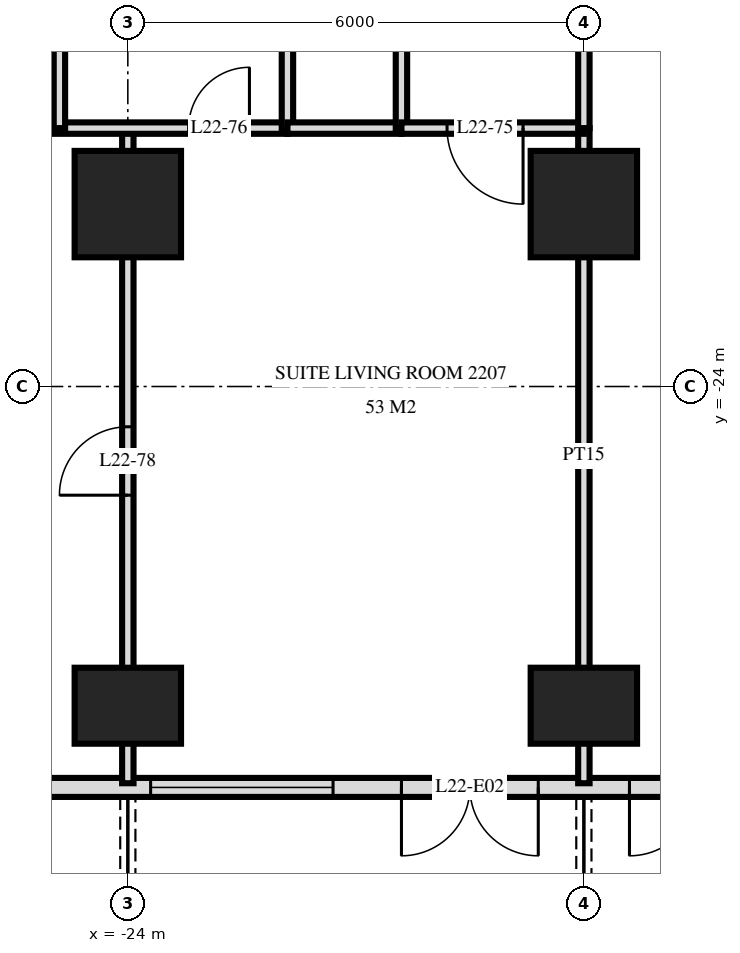
"""IFC4 building model, lengths in metres.
Left out: names, types, materials, properties, quantities, classifications, styles, units other than length and angle.
Written with IfcOpenShell. Run it as: python <this file> out.ifc"""

import sys

from ifc_helpers import new_model, si_unit, direction, frame, frame_2d, origin, origin_2d, place, context, subcontext, project, spatial, rectangle, extrude, element, fill, save


model = new_model("IFC4")
c1 = context("Model", 3, precision=1e-05, world=origin(), true_north=direction((0.0, 1.0)))
c2 = subcontext(c1, "Body", "Model", "MODEL_VIEW")
j1 = project(units=[si_unit("LENGTHUNIT", "METRE"), si_unit("PLANEANGLEUNIT", "RADIAN")], contexts=[c1])
p1 = place(None, origin())
s1 = spatial("IfcSite", under=j1, at=p1, CompositionType="ELEMENT")
p2 = place(p1, origin())
s2 = spatial("IfcBuilding", under=s1, at=p2, CompositionType="ELEMENT")
p3 = place(p2, frame((0.0, 0.0, 88.8)))
s3 = spatial("IfcBuildingStorey", under=s2, at=p3, CompositionType="ELEMENT", Elevation=88.8)
p4 = place(p3, frame((-24.0, -28.2, 0.0), z_axis=(0.0, 0.0, 1.0), x_axis=(1.0, 0.0, 0.0)))
e1 = element("IfcColumn", 1, at=p4, inside=s3, PredefinedType="COLUMN", context=c2, shape_type="SweptSolid", body=[
    extrude(rectangle(XDim=1.4, YDim=1.0, at=origin_2d()), origin(), (0.0, 0.0, 1.0), 3.6),
])
p5 = place(p3, frame((-24.0, -21.6, 0.0), z_axis=(0.0, 0.0, 1.0), x_axis=(1.0, 0.0, 0.0)))
e2 = element("IfcColumn", 2, at=p5, inside=s3, PredefinedType="COLUMN", context=c2, shape_type="SweptSolid", body=[
    extrude(rectangle(XDim=1.4, YDim=1.4, at=origin_2d()), origin(), (0.0, 0.0, 1.0), 3.6),
])
p6 = place(p3, frame((-18.0, -28.2, 0.0), z_axis=(0.0, 0.0, 1.0), x_axis=(1.0, 0.0, 0.0)))
e3 = element("IfcColumn", 3, at=p6, inside=s3, PredefinedType="COLUMN", context=c2, shape_type="SweptSolid", body=[
    extrude(rectangle(XDim=1.4, YDim=1.0, at=origin_2d()), origin(), (0.0, 0.0, 1.0), 3.6),
])
p7 = place(p3, frame((-18.0, -21.6, 0.0), z_axis=(0.0, 0.0, 1.0), x_axis=(1.0, 0.0, 0.0)))
e4 = element("IfcColumn", 4, at=p7, inside=s3, PredefinedType="COLUMN", context=c2, shape_type="SweptSolid", body=[
    extrude(rectangle(XDim=1.4, YDim=1.4, at=origin_2d()), origin(), (0.0, 0.0, 1.0), 3.6),
])
p8 = place(p3, frame((-28.775, -29.275, 0.0), z_axis=(0.0, 0.0, 1.0), x_axis=(1.0, 0.0, 0.0)))
e5 = element("IfcWall", 5, at=p8, inside=s3, PredefinedType="SOLIDWALL", context=c2, shape_type="SweptSolid", body=[
    extrude(rectangle(XDim=57.551, YDim=0.25, at=frame_2d((28.775, 0.0))), origin(), (0.0, 0.0, 1.0), 3.32),
])
p9 = place(p8, frame((0.575, 0.0, 0.0)))
e6 = element("IfcOpeningElement", 6, at=p9, cuts=e5, PredefinedType="OPENING", context=c2, shape_type="SweptSolid", body=[
    extrude(rectangle(XDim=1.8, YDim=2.4, at=frame_2d((0.9, 1.2))), frame((0.0, 0.135, 0.0), z_axis=(0.0, -1.0, 0.0), x_axis=(1.0, 0.0, 0.0)), (0.0, 0.0, 1.0), 0.27),
])
p10 = place(p8, frame((5.075, 0.0, 0.3)))
e7 = element("IfcOpeningElement", 7, at=p10, cuts=e5, PredefinedType="OPENING", context=c2, shape_type="SweptSolid", body=[
    extrude(rectangle(XDim=2.4, YDim=2.1, at=frame_2d((1.2, 1.05))), frame((0.0, 0.135, 0.0), z_axis=(0.0, -1.0, 0.0), x_axis=(1.0, 0.0, 0.0)), (0.0, 0.0, 1.0), 0.27),
])
p11 = place(p8, frame((8.375, 0.0, 0.0)))
e8 = element("IfcOpeningElement", 8, at=p11, cuts=e5, PredefinedType="OPENING", context=c2, shape_type="SweptSolid", body=[
    extrude(rectangle(XDim=1.8, YDim=2.4, at=frame_2d((0.9, 1.2))), frame((0.0, 0.135, 0.0), z_axis=(0.0, -1.0, 0.0), x_axis=(1.0, 0.0, 0.0)), (0.0, 0.0, 1.0), 0.27),
])
p12 = place(p8, frame((11.375, 0.0, 0.0)))
e9 = element("IfcOpeningElement", 9, at=p12, cuts=e5, PredefinedType="OPENING", context=c2, shape_type="SweptSolid", body=[
    extrude(rectangle(XDim=1.8, YDim=2.4, at=frame_2d((0.9, 1.2))), frame((0.0, 0.135, 0.0), z_axis=(0.0, -1.0, 0.0), x_axis=(1.0, 0.0, 0.0)), (0.0, 0.0, 1.0), 0.27),
])
p13 = place(p8, frame((14.075, 0.0, 0.3)))
e10 = element("IfcOpeningElement", 10, at=p13, cuts=e5, PredefinedType="OPENING", context=c2, shape_type="SweptSolid", body=[
    extrude(rectangle(XDim=2.4, YDim=2.1, at=frame_2d((1.2, 1.05))), frame((0.0, 0.135, 0.0), z_axis=(0.0, -1.0, 0.0), x_axis=(1.0, 0.0, 0.0)), (0.0, 0.0, 1.0), 0.27),
])
p14 = place(p8, frame((17.375, 0.0, 0.0)))
e11 = element("IfcOpeningElement", 11, at=p14, cuts=e5, PredefinedType="OPENING", context=c2, shape_type="SweptSolid", body=[
    extrude(rectangle(XDim=1.8, YDim=2.4, at=frame_2d((0.9, 1.2))), frame((0.0, 0.135, 0.0), z_axis=(0.0, -1.0, 0.0), x_axis=(1.0, 0.0, 0.0)), (0.0, 0.0, 1.0), 0.27),
])
p15 = place(p8, frame((20.075, 0.0, 0.3)))
e12 = element("IfcOpeningElement", 12, at=p15, cuts=e5, PredefinedType="OPENING", context=c2, shape_type="SweptSolid", body=[
    extrude(rectangle(XDim=2.4, YDim=2.1, at=frame_2d((1.2, 1.05))), frame((0.0, 0.135, 0.0), z_axis=(0.0, -1.0, 0.0), x_axis=(1.0, 0.0, 0.0)), (0.0, 0.0, 1.0), 0.27),
])
p16 = place(p8, frame((23.075, 0.0, 0.3)))
e13 = element("IfcOpeningElement", 13, at=p16, cuts=e5, PredefinedType="OPENING", context=c2, shape_type="SweptSolid", body=[
    extrude(rectangle(XDim=2.4, YDim=2.1, at=frame_2d((1.2, 1.05))), frame((0.0, 0.135, 0.0), z_axis=(0.0, -1.0, 0.0), x_axis=(1.0, 0.0, 0.0)), (0.0, 0.0, 1.0), 0.27),
])
p17 = place(p8, frame((26.375, 0.0, 0.0)))
e14 = element("IfcOpeningElement", 14, at=p17, cuts=e5, PredefinedType="OPENING", context=c2, shape_type="SweptSolid", body=[
    extrude(rectangle(XDim=1.8, YDim=2.4, at=frame_2d((0.9, 1.2))), frame((0.0, 0.135, 0.0), z_axis=(0.0, -1.0, 0.0), x_axis=(1.0, 0.0, 0.0)), (0.0, 0.0, 1.0), 0.27),
])
p18 = place(p8, frame((29.375, 0.0, 0.0)))
e15 = element("IfcOpeningElement", 15, at=p18, cuts=e5, PredefinedType="OPENING", context=c2, shape_type="SweptSolid", body=[
    extrude(rectangle(XDim=1.8, YDim=2.4, at=frame_2d((0.9, 1.2))), frame((0.0, 0.135, 0.0), z_axis=(0.0, -1.0, 0.0), x_axis=(1.0, 0.0, 0.0)), (0.0, 0.0, 1.0), 0.27),
])
p19 = place(p8, frame((32.075, 0.0, 0.3)))
e16 = element("IfcOpeningElement", 16, at=p19, cuts=e5, PredefinedType="OPENING", context=c2, shape_type="SweptSolid", body=[
    extrude(rectangle(XDim=2.4, YDim=2.1, at=frame_2d((1.2, 1.05))), frame((0.0, 0.135, 0.0), z_axis=(0.0, -1.0, 0.0), x_axis=(1.0, 0.0, 0.0)), (0.0, 0.0, 1.0), 0.27),
])
p20 = place(p8, frame((35.375, 0.0, 0.0)))
e17 = element("IfcOpeningElement", 17, at=p20, cuts=e5, PredefinedType="OPENING", context=c2, shape_type="SweptSolid", body=[
    extrude(rectangle(XDim=1.8, YDim=2.4, at=frame_2d((0.9, 1.2))), frame((0.0, 0.135, 0.0), z_axis=(0.0, -1.0, 0.0), x_axis=(1.0, 0.0, 0.0)), (0.0, 0.0, 1.0), 0.27),
])
p21 = place(p8, frame((38.075, 0.0, 0.3)))
e18 = element("IfcOpeningElement", 18, at=p21, cuts=e5, PredefinedType="OPENING", context=c2, shape_type="SweptSolid", body=[
    extrude(rectangle(XDim=2.4, YDim=2.1, at=frame_2d((1.2, 1.05))), frame((0.0, 0.135, 0.0), z_axis=(0.0, -1.0, 0.0), x_axis=(1.0, 0.0, 0.0)), (0.0, 0.0, 1.0), 0.27),
])
p22 = place(p8, frame((41.075, 0.0, 0.3)))
e19 = element("IfcOpeningElement", 19, at=p22, cuts=e5, PredefinedType="OPENING", context=c2, shape_type="SweptSolid", body=[
    extrude(rectangle(XDim=2.4, YDim=2.1, at=frame_2d((1.2, 1.05))), frame((0.0, 0.135, 0.0), z_axis=(0.0, -1.0, 0.0), x_axis=(1.0, 0.0, 0.0)), (0.0, 0.0, 1.0), 0.27),
])
p23 = place(p8, frame((44.375, 0.0, 0.0)))
e20 = element("IfcOpeningElement", 20, at=p23, cuts=e5, PredefinedType="OPENING", context=c2, shape_type="SweptSolid", body=[
    extrude(rectangle(XDim=1.8, YDim=2.4, at=frame_2d((0.9, 1.2))), frame((0.0, 0.135, 0.0), z_axis=(0.0, -1.0, 0.0), x_axis=(1.0, 0.0, 0.0)), (0.0, 0.0, 1.0), 0.27),
])
p24 = place(p8, frame((47.075, 0.0, 0.3)))
e21 = element("IfcOpeningElement", 21, at=p24, cuts=e5, PredefinedType="OPENING", context=c2, shape_type="SweptSolid", body=[
    extrude(rectangle(XDim=2.4, YDim=2.1, at=frame_2d((1.2, 1.05))), frame((0.0, 0.135, 0.0), z_axis=(0.0, -1.0, 0.0), x_axis=(1.0, 0.0, 0.0)), (0.0, 0.0, 1.0), 0.27),
])
p25 = place(p8, frame((50.375, 0.0, 0.0)))
e22 = element("IfcOpeningElement", 22, at=p25, cuts=e5, PredefinedType="OPENING", context=c2, shape_type="SweptSolid", body=[
    extrude(rectangle(XDim=1.8, YDim=2.4, at=frame_2d((0.9, 1.2))), frame((0.0, 0.135, 0.0), z_axis=(0.0, -1.0, 0.0), x_axis=(1.0, 0.0, 0.0)), (0.0, 0.0, 1.0), 0.27),
])
p26 = place(p8, frame((53.375, 0.0, 0.0)))
e23 = element("IfcOpeningElement", 23, at=p26, cuts=e5, PredefinedType="OPENING", context=c2, shape_type="SweptSolid", body=[
    extrude(rectangle(XDim=1.8, YDim=2.4, at=frame_2d((0.9, 1.2))), frame((0.0, 0.135, 0.0), z_axis=(0.0, -1.0, 0.0), x_axis=(1.0, 0.0, 0.0)), (0.0, 0.0, 1.0), 0.27),
])
p27 = place(p3, frame((-18.0, -20.6, 0.0), z_axis=(0.0, 0.0, 1.0), x_axis=(0.0, 1.0, 0.0)))
e24 = element("IfcWall", 24, at=p27, inside=s3, PredefinedType="PARTITIONING", context=c2, shape_type="SweptSolid", body=[
    extrude(rectangle(XDim=3.6, YDim=0.15, at=frame_2d((1.8, 0.0))), origin(), (0.0, 0.0, 1.0), 3.32),
])
p28 = place(p3, frame((-18.0, -29.22, 0.0), z_axis=(0.0, 0.0, 1.0), x_axis=(0.0, 1.0, 0.0)))
e25 = element("IfcWall", 25, at=p28, inside=s3, PredefinedType="PARTITIONING", context=c2, shape_type="SweptSolid", body=[
    extrude(rectangle(XDim=8.62, YDim=0.15, at=frame_2d((4.31, 0.0))), origin(), (0.0, 0.0, 1.0), 3.32),
])
p29 = place(p3, frame((-20.4, -20.6, 0.0), z_axis=(0.0, 0.0, 1.0), x_axis=(0.0, 1.0, 0.0)))
e26 = element("IfcWall", 26, at=p29, inside=s3, PredefinedType="PARTITIONING", context=c2, shape_type="SweptSolid", body=[
    extrude(rectangle(XDim=3.6, YDim=0.15, at=frame_2d((1.8, 0.0))), origin(), (0.0, 0.0, 1.0), 3.32),
])
p30 = place(p29, frame((1.3, 0.0, 0.0)))
e27 = element("IfcOpeningElement", 27, at=p30, cuts=e26, PredefinedType="OPENING", context=c2, shape_type="SweptSolid", body=[
    extrude(rectangle(XDim=1.0, YDim=2.1, at=frame_2d((0.5, 1.05))), frame((0.0, 0.085, 0.0), z_axis=(0.0, -1.0, 0.0), x_axis=(1.0, 0.0, 0.0)), (0.0, 0.0, 1.0), 0.17),
])
p31 = place(p3, frame((-21.9, -20.6, 0.0), z_axis=(0.0, 0.0, 1.0), x_axis=(0.0, 1.0, 0.0)))
e28 = element("IfcWall", 28, at=p31, inside=s3, PredefinedType="PLUMBINGWALL", context=c2, shape_type="SweptSolid", body=[
    extrude(rectangle(XDim=3.6, YDim=0.15, at=frame_2d((1.8, 0.0))), origin(), (0.0, 0.0, 1.0), 3.32),
])
p32 = place(p3, frame((-24.0, -29.22, 0.0), z_axis=(0.0, 0.0, 1.0), x_axis=(0.0, 1.0, 0.0)))
e29 = element("IfcWall", 29, at=p32, inside=s3, PredefinedType="PARTITIONING", context=c2, shape_type="SweptSolid", body=[
    extrude(rectangle(XDim=8.62, YDim=0.15, at=frame_2d((4.31, 0.0))), origin(), (0.0, 0.0, 1.0), 3.32),
])
p33 = place(p32, frame((3.79, 0.0, 0.0)))
e30 = element("IfcOpeningElement", 30, at=p33, cuts=e29, PredefinedType="OPENING", context=c2, shape_type="SweptSolid", body=[
    extrude(rectangle(XDim=0.9, YDim=2.1, at=frame_2d((0.45, 1.05))), frame((0.0, 0.085, 0.0), z_axis=(0.0, -1.0, 0.0), x_axis=(1.0, 0.0, 0.0)), (0.0, 0.0, 1.0), 0.17),
])
p34 = place(p3, frame((-24.9, -20.6, 0.0), z_axis=(0.0, 0.0, 1.0), x_axis=(0.0, 1.0, 0.0)))
e31 = element("IfcWall", 31, at=p34, inside=s3, PredefinedType="PARTITIONING", context=c2, shape_type="SweptSolid", body=[
    extrude(rectangle(XDim=3.6, YDim=0.15, at=frame_2d((1.8, 0.0))), origin(), (0.0, 0.0, 1.0), 3.32),
])
p35 = place(p3, frame((-20.4, -20.6, 0.0), z_axis=(0.0, 0.0, 1.0), x_axis=(1.0, 0.0, 0.0)))
e32 = element("IfcWall", 32, at=p35, inside=s3, PredefinedType="PARTITIONING", context=c2, shape_type="SweptSolid", body=[
    extrude(rectangle(XDim=2.4, YDim=0.15, at=frame_2d((1.2, 0.0))), origin(), (0.0, 0.0, 1.0), 3.32),
])
p36 = place(p35, frame((0.6, 0.0, 0.0)))
e33 = element("IfcOpeningElement", 33, at=p36, cuts=e32, PredefinedType="OPENING", context=c2, shape_type="SweptSolid", body=[
    extrude(rectangle(XDim=1.0, YDim=2.1, at=frame_2d((0.5, 1.05))), frame((0.0, 0.085, 0.0), z_axis=(0.0, -1.0, 0.0), x_axis=(1.0, 0.0, 0.0)), (0.0, 0.0, 1.0), 0.17),
])
p37 = place(p3, frame((-33.12, -20.6, 0.0), z_axis=(0.0, 0.0, 1.0), x_axis=(1.0, 0.0, 0.0)))
e34 = element("IfcWall", 34, at=p37, inside=s3, PredefinedType="PARTITIONING", context=c2, shape_type="SweptSolid", body=[
    extrude(rectangle(XDim=11.22, YDim=0.15, at=frame_2d((5.61, 0.0))), origin(), (0.0, 0.0, 1.0), 3.32),
])
p38 = place(p37, frame((9.92, 0.0, 0.0)))
e35 = element("IfcOpeningElement", 35, at=p38, cuts=e34, PredefinedType="OPENING", context=c2, shape_type="SweptSolid", body=[
    extrude(rectangle(XDim=0.8, YDim=2.1, at=frame_2d((0.4, 1.05))), frame((0.0, 0.085, 0.0), z_axis=(0.0, -1.0, 0.0), x_axis=(1.0, 0.0, 0.0)), (0.0, 0.0, 1.0), 0.17),
])
p39 = place(p37, frame((3.92, 0.0, 0.0)))
e36 = element("IfcOpeningElement", 36, at=p39, cuts=e34, PredefinedType="OPENING", context=c2, shape_type="SweptSolid", body=[
    extrude(rectangle(XDim=0.9, YDim=2.1, at=frame_2d((0.45, 1.05))), frame((0.0, 0.085, 0.0), z_axis=(0.0, -1.0, 0.0), x_axis=(1.0, 0.0, 0.0)), (0.0, 0.0, 1.0), 0.17),
])
p40 = place(p3, frame((-21.9, -20.6, 0.0), z_axis=(0.0, 0.0, 1.0), x_axis=(1.0, 0.0, 0.0)))
e37 = element("IfcWall", 37, at=p40, inside=s3, PredefinedType="PLUMBINGWALL", context=c2, shape_type="SweptSolid", body=[
    extrude(rectangle(XDim=1.5, YDim=0.15, at=frame_2d((0.75, 0.0))), origin(), (0.0, 0.0, 1.0), 3.32),
])
p41 = place(p10, origin())
e38 = element("IfcWindow", 38, at=p41, inside=s3, PartitioningType="SINGLE_PANEL", PredefinedType="WINDOW", context=c2, shape_type="SweptSolid", body=[
    extrude(rectangle(XDim=2.4, YDim=2.1, at=frame_2d((1.2, 1.05))), frame((0.0, 0.03, 0.0), z_axis=(0.0, -1.0, 0.0), x_axis=(1.0, 0.0, 0.0)), (0.0, 0.0, 1.0), 0.06),
])
fill(e7, e38)
p42 = place(p11, frame((0.9, 0.0, 0.0), z_axis=(0.0, 0.0, 1.0), x_axis=(-1.0, 0.0, 0.0)))
e39 = element("IfcDoor", 39, at=p42, inside=s3, OperationType="DOUBLE_DOOR_SINGLE_SWING", PredefinedType="DOOR", context=c2, shape_type="SweptSolid", body=[
    extrude(rectangle(XDim=1.8, YDim=2.4, at=frame_2d((0.0, 1.2))), frame((0.0, -0.025, 0.0), z_axis=(0.0, 1.0, 0.0), x_axis=(-1.0, 0.0, 0.0)), (0.0, 0.0, 1.0), 0.05),
])
fill(e8, e39)
p43 = place(p12, frame((0.9, 0.0, 0.0), z_axis=(0.0, 0.0, 1.0), x_axis=(-1.0, 0.0, 0.0)))
e40 = element("IfcDoor", 40, at=p43, inside=s3, OperationType="DOUBLE_DOOR_SINGLE_SWING", PredefinedType="DOOR", context=c2, shape_type="SweptSolid", body=[
    extrude(rectangle(XDim=1.8, YDim=2.4, at=frame_2d((0.0, 1.2))), frame((0.0, -0.025, 0.0), z_axis=(0.0, 1.0, 0.0), x_axis=(-1.0, 0.0, 0.0)), (0.0, 0.0, 1.0), 0.05),
])
fill(e9, e40)
p44 = place(p36, frame((0.5, 0.0, 0.0), z_axis=(0.0, 0.0, 1.0), x_axis=(-1.0, 0.0, 0.0)))
e41 = element("IfcDoor", 41, at=p44, inside=s3, OperationType="SINGLE_SWING_RIGHT", PredefinedType="DOOR", context=c2, shape_type="SweptSolid", body=[
    extrude(rectangle(XDim=1.0, YDim=2.1, at=frame_2d((0.0, 1.05))), frame((0.0, -0.025, 0.0), z_axis=(0.0, 1.0, 0.0), x_axis=(-1.0, 0.0, 0.0)), (0.0, 0.0, 1.0), 0.05),
])
fill(e33, e41)
p45 = place(p38, origin())
e42 = element("IfcDoor", 42, at=p45, inside=s3, OperationType="SINGLE_SWING_LEFT", PredefinedType="DOOR", context=c2, shape_type="SweptSolid", body=[
    extrude(rectangle(XDim=0.8, YDim=2.1, at=frame_2d((0.4, 1.05))), frame((0.0, 0.025, 0.0), z_axis=(0.0, -1.0, 0.0), x_axis=(1.0, 0.0, 0.0)), (0.0, 0.0, 1.0), 0.05),
])
fill(e35, e42)
p46 = place(p33, origin())
e43 = element("IfcDoor", 43, at=p46, inside=s3, OperationType="SINGLE_SWING_RIGHT", PredefinedType="DOOR", context=c2, shape_type="SweptSolid", body=[
    extrude(rectangle(XDim=0.9, YDim=2.1, at=frame_2d((0.45, 1.05))), frame((0.0, 0.025, 0.0), z_axis=(0.0, -1.0, 0.0), x_axis=(1.0, 0.0, 0.0)), (0.0, 0.0, 1.0), 0.05),
])
fill(e30, e43)
save(model, sys.argv[1])
